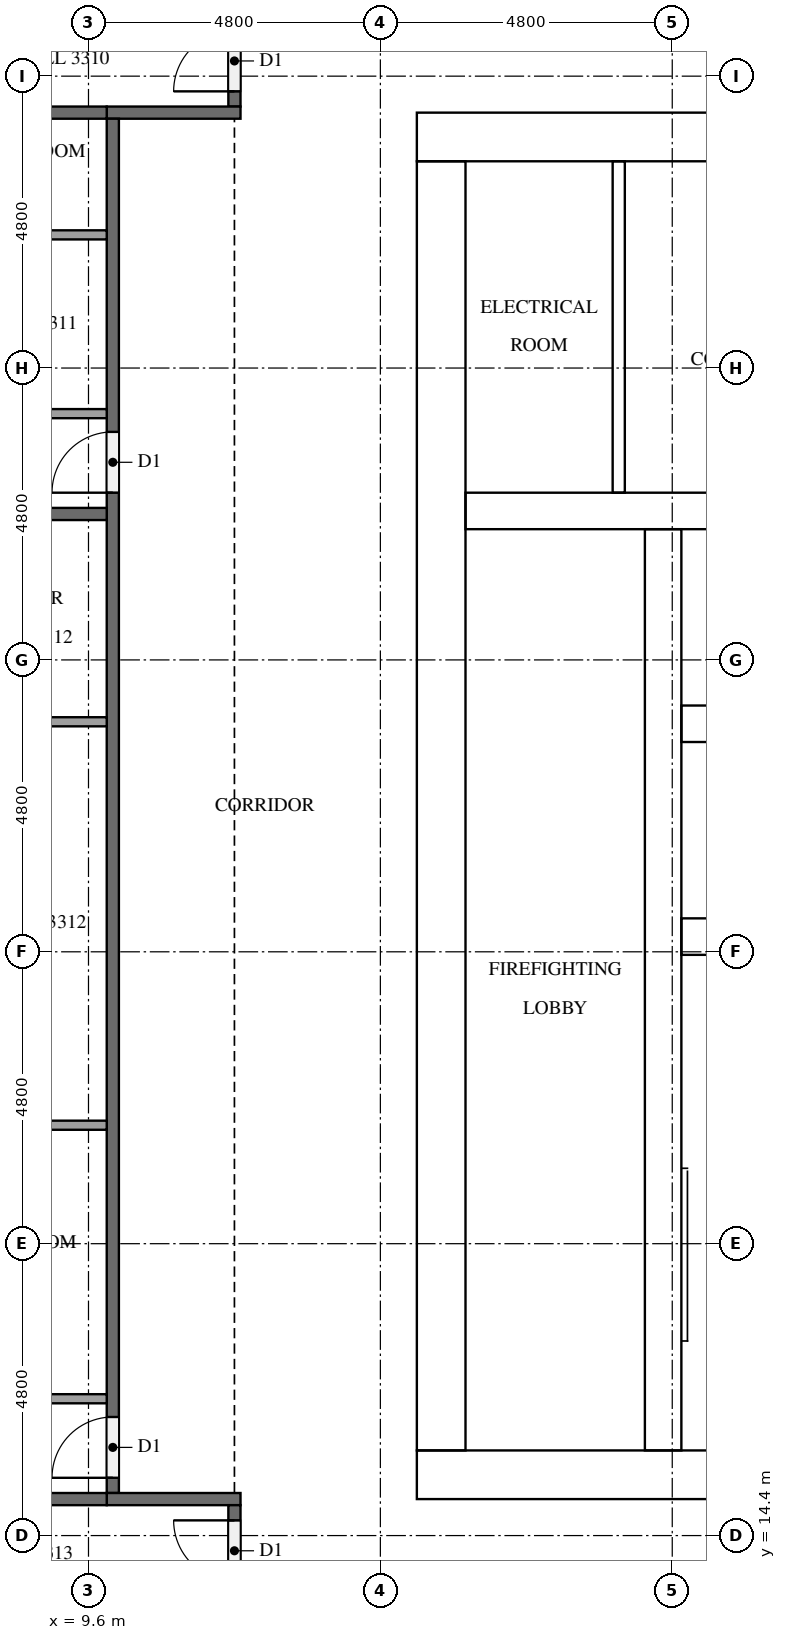
"""IFC4 building model, lengths in metres.
Left out: names, types, materials, properties, quantities, classifications, styles, units other than length and angle.
Written with IfcOpenShell. Run it as: python <this file> out.ifc"""

import sys

from ifc_helpers import new_model, si_unit, direction, frame, frame_2d, origin, place, context, subcontext, project, spatial, rectangle, extrude, element, fill, save


model = new_model("IFC4")
c1 = context("Model", 3, precision=1e-05, world=origin(), true_north=direction((0.0, 1.0)))
c2 = subcontext(c1, "Body", "Model", "MODEL_VIEW")
j1 = project(units=[si_unit("LENGTHUNIT", "METRE"), si_unit("PLANEANGLEUNIT", "RADIAN")], contexts=[c1])
p1 = place(None, origin())
s1 = spatial("IfcSite", under=j1, at=p1, CompositionType="ELEMENT")
p2 = place(p1, origin())
s2 = spatial("IfcBuilding", under=s1, at=p2, CompositionType="ELEMENT")
p3 = place(p2, frame((0.0, 0.0, 129.6)))
s3 = spatial("IfcBuildingStorey", under=s2, at=p3, CompositionType="ELEMENT", Elevation=129.6)
p4 = place(p3, frame((15.0, 15.4, 0.0), z_axis=(0.0, 0.0, 1.0), x_axis=(1.0, 0.0, 0.0)))
e1 = element("IfcWall", 1, at=p4, inside=s3, PredefinedType="SHEAR", context=c2, shape_type="SweptSolid", body=[
    extrude(rectangle(XDim=32.4, YDim=0.8, at=frame_2d((16.2, 0.0))), origin(), (0.0, 0.0, 1.0), 3.2),
])
p5 = place(p4, frame((15.3, 0.0, 0.0)))
e2 = element("IfcOpeningElement", 2, at=p5, cuts=e1, PredefinedType="OPENING", context=c2, shape_type="SweptSolid", body=[
    extrude(rectangle(XDim=1.8, YDim=2.1, at=frame_2d((0.9, 1.05))), frame((0.0, 0.41, 0.0), z_axis=(0.0, -1.0, 0.0), x_axis=(1.0, 0.0, 0.0)), (0.0, 0.0, 1.0), 0.82),
])
p6 = place(p3, frame((15.0, 37.4, 0.0), z_axis=(0.0, 0.0, 1.0), x_axis=(1.0, 0.0, 0.0)))
e3 = element("IfcWall", 3, at=p6, inside=s3, PredefinedType="SHEAR", context=c2, shape_type="SweptSolid", body=[
    extrude(rectangle(XDim=32.4, YDim=0.8, at=frame_2d((16.2, 0.0))), origin(), (0.0, 0.0, 1.0), 3.2),
])
p7 = place(p6, frame((15.3, 0.0, 0.0)))
e4 = element("IfcOpeningElement", 4, at=p7, cuts=e3, PredefinedType="OPENING", context=c2, shape_type="SweptSolid", body=[
    extrude(rectangle(XDim=1.8, YDim=2.1, at=frame_2d((0.9, 1.05))), frame((0.0, 0.41, 0.0), z_axis=(0.0, -1.0, 0.0), x_axis=(1.0, 0.0, 0.0)), (0.0, 0.0, 1.0), 0.82),
])
p8 = place(p6, frame((1.51, 0.0, 0.0)))
e5 = element("IfcOpeningElement", 5, at=p8, cuts=e3, PredefinedType="OPENING", context=c2, shape_type="SweptSolid", body=[
    extrude(rectangle(XDim=1.0, YDim=2.1, at=frame_2d((0.5, 1.05))), frame((0.0, 0.41, 0.0), z_axis=(0.0, -1.0, 0.0), x_axis=(1.0, 0.0, 0.0)), (0.0, 0.0, 1.0), 0.82),
])
p9 = place(p6, frame((5.11, 0.0, 0.0)))
e6 = element("IfcOpeningElement", 6, at=p9, cuts=e3, PredefinedType="OPENING", context=c2, shape_type="SweptSolid", body=[
    extrude(rectangle(XDim=1.0, YDim=2.1, at=frame_2d((0.5, 1.05))), frame((0.0, 0.41, 0.0), z_axis=(0.0, -1.0, 0.0), x_axis=(1.0, 0.0, 0.0)), (0.0, 0.0, 1.0), 0.82),
])
p10 = place(p3, frame((15.4, 15.8, 0.0), z_axis=(0.0, 0.0, 1.0), x_axis=(0.0, 1.0, 0.0)))
e7 = element("IfcWall", 7, at=p10, inside=s3, PredefinedType="SHEAR", context=c2, shape_type="SweptSolid", body=[
    extrude(rectangle(XDim=21.2, YDim=0.8, at=frame_2d((10.6, 0.0))), origin(), (0.0, 0.0, 1.0), 3.2),
])
p11 = place(p10, frame((4.96, 0.0, 0.0)))
e8 = element("IfcOpeningElement", 8, at=p11, cuts=e7, PredefinedType="OPENING", context=c2, shape_type="SweptSolid", body=[
    extrude(rectangle(XDim=1.2, YDim=2.1, at=frame_2d((0.6, 1.05))), frame((0.0, 0.41, 0.0), z_axis=(0.0, -1.0, 0.0), x_axis=(1.0, 0.0, 0.0)), (0.0, 0.0, 1.0), 0.82),
])
p12 = place(p3, frame((19.05, 15.8, 0.0), z_axis=(0.0, 0.0, 1.0), x_axis=(0.0, 1.0, 0.0)))
e9 = element("IfcWall", 9, at=p12, inside=s3, PredefinedType="SHEAR", context=c2, shape_type="SweptSolid", body=[
    extrude(rectangle(XDim=15.15, YDim=0.6, at=frame_2d((7.575, 0.0))), origin(), (0.0, 0.0, 1.0), 3.2),
])
p13 = place(p12, frame((9.65, 0.0, 0.0)))
e10 = element("IfcOpeningElement", 10, at=p13, cuts=e9, PredefinedType="OPENING", context=c2, shape_type="SweptSolid", body=[
    extrude(rectangle(XDim=1.1, YDim=2.1, at=frame_2d((0.55, 1.05))), frame((0.0, 0.31, 0.0), z_axis=(0.0, -1.0, 0.0), x_axis=(1.0, 0.0, 0.0)), (0.0, 0.0, 1.0), 0.62),
])
p14 = place(p12, frame((13.15, 0.0, 0.0)))
e11 = element("IfcOpeningElement", 11, at=p14, cuts=e9, PredefinedType="OPENING", context=c2, shape_type="SweptSolid", body=[
    extrude(rectangle(XDim=1.1, YDim=2.1, at=frame_2d((0.55, 1.05))), frame((0.0, 0.31, 0.0), z_axis=(0.0, -1.0, 0.0), x_axis=(1.0, 0.0, 0.0)), (0.0, 0.0, 1.0), 0.62),
])
p15 = place(p12, frame((0.4, 0.0, 0.0)))
e12 = element("IfcOpeningElement", 12, at=p15, cuts=e9, PredefinedType="OPENING", context=c2, shape_type="SweptSolid", body=[
    extrude(rectangle(XDim=1.2, YDim=2.1, at=frame_2d((0.6, 1.05))), frame((0.0, 0.31, 0.0), z_axis=(0.0, -1.0, 0.0), x_axis=(1.0, 0.0, 0.0)), (0.0, 0.0, 1.0), 0.62),
])
for number, where, z_axis, x_axis in (
    (13, (19.35, 24.25, 0.0), (0.0, 0.0, 1.0), (1.0, 0.0, 0.0)),
    (14, (19.35, 27.75, 0.0), (0.0, 0.0, 1.0), (1.0, 0.0, 0.0)),
):
    element("IfcWall", number, at=place(p3, frame(where, z_axis=z_axis, x_axis=x_axis)), inside=s3, PredefinedType="SHEAR", context=c2, shape_type="SweptSolid", body=[
        extrude(rectangle(XDim=3.45, YDim=0.6, at=frame_2d((1.725, 0.0))), origin(), (0.0, 0.0, 1.0), 3.2),
    ])
p16 = place(p3, frame((15.8, 31.25, 0.0), z_axis=(0.0, 0.0, 1.0), x_axis=(1.0, 0.0, 0.0)))
e15 = element("IfcWall", 15, at=p16, inside=s3, PredefinedType="SHEAR", context=c2, shape_type="SweptSolid", body=[
    extrude(rectangle(XDim=7.0, YDim=0.6, at=frame_2d((3.5, 0.0))), origin(), (0.0, 0.0, 1.0), 3.2),
])
p17 = place(p3, frame((18.32, 31.55, 0.0), z_axis=(0.0, 0.0, 1.0), x_axis=(0.0, 1.0, 0.0)))
e16 = element("IfcWall", 16, at=p17, inside=s3, PredefinedType="PARTITIONING", context=c2, shape_type="SweptSolid", body=[
    extrude(rectangle(XDim=5.45, YDim=0.2, at=frame_2d((2.725, 0.0))), origin(), (0.0, 0.0, 1.0), 3.2),
])
p18 = place(p3, frame((12.0, 37.9, 0.0), z_axis=(0.0, 0.0, 1.0), x_axis=(0.0, 1.0, 0.0)))
e17 = element("IfcWall", 17, at=p18, inside=s3, PredefinedType="PARTITIONING", context=c2, shape_type="SweptSolid", body=[
    extrude(rectangle(XDim=2.8, YDim=0.2, at=frame_2d((1.4, 0.0))), origin(), (0.0, 0.0, 1.0), 3.2),
])
p19 = place(p18, frame((0.25, 0.0, 0.0)))
e18 = element("IfcOpeningElement", 18, at=p19, cuts=e17, PredefinedType="OPENING", context=c2, shape_type="SweptSolid", body=[
    extrude(rectangle(XDim=1.0, YDim=2.1, at=frame_2d((0.5, 1.05))), frame((0.0, 0.11, 0.0), z_axis=(0.0, -1.0, 0.0), x_axis=(1.0, 0.0, 0.0)), (0.0, 0.0, 1.0), 0.22),
])
p20 = place(p3, frame((12.1, 37.8, 0.0), z_axis=(0.0, 0.0, 1.0), x_axis=(-1.0, 0.0, 0.0)))
e19 = element("IfcWall", 19, at=p20, inside=s3, PredefinedType="PARTITIONING", context=c2, shape_type="SweptSolid", body=[
    extrude(rectangle(XDim=2.2, YDim=0.2, at=frame_2d((1.1, 0.0))), origin(), (0.0, 0.0, 1.0), 3.2),
])
p21 = place(p3, frame((10.0, 15.1, 0.0), z_axis=(0.0, 0.0, 1.0), x_axis=(0.0, 1.0, 0.0)))
e20 = element("IfcWall", 20, at=p21, inside=s3, PredefinedType="PARTITIONING", context=c2, shape_type="SweptSolid", body=[
    extrude(rectangle(XDim=22.6, YDim=0.2, at=frame_2d((11.3, 0.0))), origin(), (0.0, 0.0, 1.0), 3.2),
])
p22 = place(p21, frame((16.45, 0.0, 0.0)))
e21 = element("IfcOpeningElement", 21, at=p22, cuts=e20, PredefinedType="OPENING", context=c2, shape_type="SweptSolid", body=[
    extrude(rectangle(XDim=1.0, YDim=2.1, at=frame_2d((0.5, 1.05))), frame((0.0, 0.11, 0.0), z_axis=(0.0, -1.0, 0.0), x_axis=(1.0, 0.0, 0.0)), (0.0, 0.0, 1.0), 0.22),
])
p23 = place(p21, frame((0.25, 0.0, 0.0)))
e22 = element("IfcOpeningElement", 22, at=p23, cuts=e20, PredefinedType="OPENING", context=c2, shape_type="SweptSolid", body=[
    extrude(rectangle(XDim=1.0, YDim=2.1, at=frame_2d((0.5, 1.05))), frame((0.0, 0.11, 0.0), z_axis=(0.0, -1.0, 0.0), x_axis=(1.0, 0.0, 0.0)), (0.0, 0.0, 1.0), 0.22),
])
p24 = place(p3, frame((9.9, 15.0, 0.0), z_axis=(0.0, 0.0, 1.0), x_axis=(1.0, 0.0, 0.0)))
e23 = element("IfcWall", 23, at=p24, inside=s3, PredefinedType="PARTITIONING", context=c2, shape_type="SweptSolid", body=[
    extrude(rectangle(XDim=2.2, YDim=0.2, at=frame_2d((1.1, 0.0))), origin(), (0.0, 0.0, 1.0), 3.2),
])
p25 = place(p3, frame((12.0, 12.1, 0.0), z_axis=(0.0, 0.0, 1.0), x_axis=(0.0, 1.0, 0.0)))
e24 = element("IfcWall", 24, at=p25, inside=s3, PredefinedType="PARTITIONING", context=c2, shape_type="SweptSolid", body=[
    extrude(rectangle(XDim=2.8, YDim=0.2, at=frame_2d((1.4, 0.0))), origin(), (0.0, 0.0, 1.0), 3.2),
])
p26 = place(p25, frame((1.55, 0.0, 0.0)))
e25 = element("IfcOpeningElement", 25, at=p26, cuts=e24, PredefinedType="OPENING", context=c2, shape_type="SweptSolid", body=[
    extrude(rectangle(XDim=1.0, YDim=2.1, at=frame_2d((0.5, 1.05))), frame((0.0, 0.11, 0.0), z_axis=(0.0, -1.0, 0.0), x_axis=(1.0, 0.0, 0.0)), (0.0, 0.0, 1.0), 0.22),
])
p27 = place(p3, frame((0.375, 37.8, 0.0), z_axis=(0.0, 0.0, 1.0), x_axis=(1.0, 0.0, 0.0)))
e26 = element("IfcWall", 26, at=p27, inside=s3, PredefinedType="PARTITIONING", context=c2, shape_type="SweptSolid", body=[
    extrude(rectangle(XDim=9.525, YDim=0.2, at=frame_2d((4.762, 0.0))), origin(), (0.0, 0.0, 1.0), 3.2),
])
for number, where, z_axis, x_axis in (
    (27, (0.1, 31.2, 0.0), (0.0, 0.0, 1.0), (1.0, 0.0, 0.0)),
    (28, (0.1, 15.0, 0.0), (0.0, 0.0, 1.0), (1.0, 0.0, 0.0)),
):
    element("IfcWall", number, at=place(p3, frame(where, z_axis=z_axis, x_axis=x_axis)), inside=s3, PredefinedType="PARTITIONING", context=c2, shape_type="SweptSolid", body=[
        extrude(rectangle(XDim=9.8, YDim=0.2, at=frame_2d((4.9, 0.0))), origin(), (0.0, 0.0, 1.0), 3.2),
    ])
p28 = place(p3, frame((9.9, 35.79, 0.0), z_axis=(0.0, 0.0, 1.0), x_axis=(-1.0, 0.0, 0.0)))
e29 = element("IfcWall", 29, at=p28, inside=s3, PredefinedType="PARTITIONING", context=c2, shape_type="SweptSolid", body=[
    extrude(rectangle(XDim=3.075, YDim=0.15, at=frame_2d((1.538, 0.0))), origin(), (0.0, 0.0, 1.0), 3.2),
])
p29 = place(p3, frame((9.9, 32.85, 0.0), z_axis=(0.0, 0.0, 1.0), x_axis=(-1.0, 0.0, 0.0)))
e30 = element("IfcWall", 30, at=p29, inside=s3, PredefinedType="PARTITIONING", context=c2, shape_type="SweptSolid", body=[
    extrude(rectangle(XDim=3.225, YDim=0.15, at=frame_2d((1.612, 0.0))), origin(), (0.0, 0.0, 1.0), 3.2),
])
for number, where, z_axis, x_axis in (
    (31, (9.9, 21.148, 0.0), (0.0, 0.0, 1.0), (-1.0, 0.0, 0.0)),
    (32, (9.9, 27.783, 0.0), (0.0, 0.0, 1.0), (-1.0, 0.0, 0.0)),
):
    element("IfcWall", number, at=place(p3, frame(where, z_axis=z_axis, x_axis=x_axis)), inside=s3, PredefinedType="PARTITIONING", context=c2, shape_type="SweptSolid", body=[
        extrude(rectangle(XDim=2.775, YDim=0.15, at=frame_2d((1.387, 0.0))), origin(), (0.0, 0.0, 1.0), 3.2),
    ])
p30 = place(p3, frame((9.9, 16.65, 0.0), z_axis=(0.0, 0.0, 1.0), x_axis=(-1.0, 0.0, 0.0)))
e33 = element("IfcWall", 33, at=p30, inside=s3, PredefinedType="PARTITIONING", context=c2, shape_type="SweptSolid", body=[
    extrude(rectangle(XDim=2.925, YDim=0.15, at=frame_2d((1.462, 0.0))), origin(), (0.0, 0.0, 1.0), 3.2),
])
p31 = place(p13, origin())
e34 = element("IfcDoor", 34, at=p31, inside=s3, OperationType="DOUBLE_DOOR_SLIDING", PredefinedType="DOOR", context=c2, shape_type="SweptSolid", body=[
    extrude(rectangle(XDim=1.1, YDim=2.1, at=frame_2d((0.55, 1.05))), frame((0.0, 0.025, 0.0), z_axis=(0.0, -1.0, 0.0), x_axis=(1.0, 0.0, 0.0)), (0.0, 0.0, 1.0), 0.05),
])
fill(e10, e34)
p32 = place(p14, origin())
e35 = element("IfcDoor", 35, at=p32, inside=s3, OperationType="DOUBLE_DOOR_SLIDING", PredefinedType="DOOR", context=c2, shape_type="SweptSolid", body=[
    extrude(rectangle(XDim=1.1, YDim=2.1, at=frame_2d((0.55, 1.05))), frame((0.0, 0.025, 0.0), z_axis=(0.0, -1.0, 0.0), x_axis=(1.0, 0.0, 0.0)), (0.0, 0.0, 1.0), 0.05),
])
fill(e11, e35)
p33 = place(p15, frame((1.2, 0.0, 0.0), z_axis=(0.0, 0.0, 1.0), x_axis=(-1.0, 0.0, 0.0)))
e36 = element("IfcDoor", 36, at=p33, inside=s3, OperationType="SINGLE_SWING_LEFT", PredefinedType="DOOR", context=c2, shape_type="SweptSolid", body=[
    extrude(rectangle(XDim=1.2, YDim=2.1, at=frame_2d((0.6, 1.05))), frame((0.0, 0.025, 0.0), z_axis=(0.0, -1.0, 0.0), x_axis=(1.0, 0.0, 0.0)), (0.0, 0.0, 1.0), 0.05),
])
fill(e12, e36)
p34 = place(p11, frame((1.2, 0.0, 0.0), z_axis=(0.0, 0.0, 1.0), x_axis=(-1.0, 0.0, 0.0)))
e37 = element("IfcDoor", 37, at=p34, inside=s3, OperationType="SINGLE_SWING_RIGHT", PredefinedType="DOOR", context=c2, shape_type="SweptSolid", body=[
    extrude(rectangle(XDim=1.2, YDim=2.1, at=frame_2d((0.6, 1.05))), frame((0.0, 0.025, 0.0), z_axis=(0.0, -1.0, 0.0), x_axis=(1.0, 0.0, 0.0)), (0.0, 0.0, 1.0), 0.05),
])
fill(e8, e37)
p35 = place(p8, origin())
e38 = element("IfcDoor", 38, at=p35, inside=s3, OperationType="SINGLE_SWING_RIGHT", PredefinedType="DOOR", context=c2, shape_type="SweptSolid", body=[
    extrude(rectangle(XDim=1.0, YDim=2.1, at=frame_2d((0.5, 1.05))), frame((0.0, 0.025, 0.0), z_axis=(0.0, -1.0, 0.0), x_axis=(1.0, 0.0, 0.0)), (0.0, 0.0, 1.0), 0.05),
])
fill(e5, e38)
p36 = place(p19, origin())
e39 = element("IfcDoor", 39, at=p36, inside=s3, OperationType="SINGLE_SWING_LEFT", PredefinedType="DOOR", context=c2, shape_type="SweptSolid", body=[
    extrude(rectangle(XDim=1.0, YDim=2.1, at=frame_2d((0.5, 1.05))), frame((0.0, 0.025, 0.0), z_axis=(0.0, -1.0, 0.0), x_axis=(1.0, 0.0, 0.0)), (0.0, 0.0, 1.0), 0.05),
])
fill(e18, e39)
p37 = place(p22, origin())
e40 = element("IfcDoor", 40, at=p37, inside=s3, OperationType="SINGLE_SWING_LEFT", PredefinedType="DOOR", context=c2, shape_type="SweptSolid", body=[
    extrude(rectangle(XDim=1.0, YDim=2.1, at=frame_2d((0.5, 1.05))), frame((0.0, 0.025, 0.0), z_axis=(0.0, -1.0, 0.0), x_axis=(1.0, 0.0, 0.0)), (0.0, 0.0, 1.0), 0.05),
])
fill(e21, e40)
p38 = place(p23, origin())
e41 = element("IfcDoor", 41, at=p38, inside=s3, OperationType="SINGLE_SWING_LEFT", PredefinedType="DOOR", context=c2, shape_type="SweptSolid", body=[
    extrude(rectangle(XDim=1.0, YDim=2.1, at=frame_2d((0.5, 1.05))), frame((0.0, 0.025, 0.0), z_axis=(0.0, -1.0, 0.0), x_axis=(1.0, 0.0, 0.0)), (0.0, 0.0, 1.0), 0.05),
])
fill(e22, e41)
p39 = place(p26, origin())
e42 = element("IfcDoor", 42, at=p39, inside=s3, OperationType="SINGLE_SWING_RIGHT", PredefinedType="DOOR", context=c2, shape_type="SweptSolid", body=[
    extrude(rectangle(XDim=1.0, YDim=2.1, at=frame_2d((0.5, 1.05))), frame((0.0, 0.025, 0.0), z_axis=(0.0, -1.0, 0.0), x_axis=(1.0, 0.0, 0.0)), (0.0, 0.0, 1.0), 0.05),
])
fill(e25, e42)
save(model, sys.argv[1])
